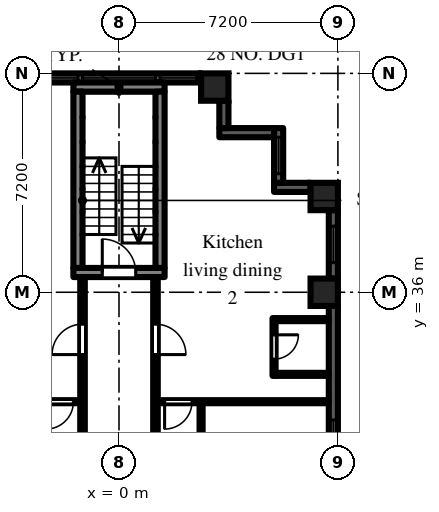
"""IFC4 building model, lengths in metres.
Left out: names, types, materials, properties, quantities, classifications, styles, units other than length and angle.
Written with IfcOpenShell. Run it as: python <this file> out.ifc"""

import sys

from ifc_helpers import new_model, si_unit, direction, frame, frame_2d, origin, origin_2d, place, context, subcontext, project, spatial, rectangle, extrude, element, fill, save


model = new_model("IFC4")
c1 = context("Model", 3, precision=1e-05, world=origin(), true_north=direction((0.0, 1.0)))
c2 = subcontext(c1, "Body", "Model", "MODEL_VIEW")
j1 = project(units=[si_unit("LENGTHUNIT", "METRE"), si_unit("PLANEANGLEUNIT", "RADIAN")], contexts=[c1])
p1 = place(None, origin())
s1 = spatial("IfcSite", under=j1, at=p1, CompositionType="ELEMENT")
p2 = place(p1, origin())
s2 = spatial("IfcBuilding", under=s1, at=p2, CompositionType="ELEMENT")
p3 = place(p2, frame((0.0, 0.0, 20.7)))
s3 = spatial("IfcBuildingStorey", under=s2, at=p3, CompositionType="ELEMENT", Elevation=20.7)
for number, where, z_axis, x_axis in (
    (1, (3.15, 42.75, 0.0), (0.0, 0.0, 1.0), (1.0, 0.0, 0.0)),
    (2, (6.75, 36.0, 0.0), (0.0, 0.0, 1.0), (1.0, 0.0, 0.0)),
    (3, (6.75, 39.15, 0.0), (0.0, 0.0, 1.0), (1.0, 0.0, 0.0)),
):
    element("IfcColumn", number, at=place(p3, frame(where, z_axis=z_axis, x_axis=x_axis)), inside=s3, PredefinedType="COLUMN", context=c2, shape_type="SweptSolid", body=[
        extrude(rectangle(XDim=0.9, YDim=0.9, at=origin_2d()), origin(), (0.0, 0.0, 1.0), 3.0),
    ])
p4 = place(p3, frame((7.05, 29.25, 0.0), z_axis=(0.0, 0.0, 1.0), x_axis=(0.0, 1.0, 0.0)))
e4 = element("IfcWall", 4, at=p4, inside=s3, PredefinedType="SOLIDWALL", context=c2, shape_type="SweptSolid", body=[
    extrude(rectangle(XDim=6.3, YDim=0.3, at=frame_2d((3.15, 0.0))), origin(), (0.0, 0.0, 1.0), 2.1),
])
p5 = place(p4, frame((0.15, 0.0, 0.2)))
e5 = element("IfcOpeningElement", 5, at=p5, cuts=e4, PredefinedType="OPENING", context=c2, shape_type="SweptSolid", body=[
    extrude(rectangle(XDim=2.4, YDim=1.85, at=frame_2d((1.2, 0.925))), frame((0.0, 0.16, 0.0), z_axis=(0.0, -1.0, 0.0), x_axis=(1.0, 0.0, 0.0)), (0.0, 0.0, 1.0), 0.32),
])
p6 = place(p3, frame((7.05, 36.45, 0.0), z_axis=(0.0, 0.0, 1.0), x_axis=(0.0, 1.0, 0.0)))
e6 = element("IfcWall", 6, at=p6, inside=s3, PredefinedType="SOLIDWALL", context=c2, shape_type="SweptSolid", body=[
    extrude(rectangle(XDim=2.25, YDim=0.3, at=frame_2d((1.125, 0.0))), origin(), (0.0, 0.0, 1.0), 2.1),
])
p7 = place(p6, frame((0.525, 0.0, 0.2)))
e7 = element("IfcOpeningElement", 7, at=p7, cuts=e6, PredefinedType="OPENING", context=c2, shape_type="SweptSolid", body=[
    extrude(rectangle(XDim=1.2, YDim=1.85, at=frame_2d((0.6, 0.925))), frame((0.0, 0.16, 0.0), z_axis=(0.0, -1.0, 0.0), x_axis=(1.0, 0.0, 0.0)), (0.0, 0.0, 1.0), 0.32),
])
p8 = place(p3, frame((6.3, 39.45, 0.0), z_axis=(0.0, 0.0, 1.0), x_axis=(-1.0, 0.0, 0.0)))
e8 = element("IfcWall", 8, at=p8, inside=s3, PredefinedType="SOLIDWALL", context=c2, shape_type="SweptSolid", body=[
    extrude(rectangle(XDim=1.2, YDim=0.3, at=frame_2d((0.6, 0.0))), origin(), (0.0, 0.0, 1.0), 2.575),
])
p9 = place(p3, frame((5.25, 39.6, 0.0), z_axis=(0.0, 0.0, 1.0), x_axis=(0.0, 1.0, 0.0)))
e9 = element("IfcWall", 9, at=p9, inside=s3, PredefinedType="SOLIDWALL", context=c2, shape_type="SweptSolid", body=[
    extrude(rectangle(XDim=1.8, YDim=0.3, at=frame_2d((0.9, 0.0))), origin(), (0.0, 0.0, 1.0), 2.575),
])
p10 = place(p9, frame((0.3, 0.0, 0.2)))
e10 = element("IfcOpeningElement", 10, at=p10, cuts=e9, PredefinedType="OPENING", context=c2, shape_type="SweptSolid", body=[
    extrude(rectangle(XDim=1.2, YDim=1.85, at=frame_2d((0.6, 0.925))), frame((0.0, 0.16, 0.0), z_axis=(0.0, -1.0, 0.0), x_axis=(1.0, 0.0, 0.0)), (0.0, 0.0, 1.0), 0.32),
])
p11 = place(p3, frame((5.1, 41.25, 0.0), z_axis=(0.0, 0.0, 1.0), x_axis=(-1.0, 0.0, 0.0)))
e11 = element("IfcWall", 11, at=p11, inside=s3, PredefinedType="SOLIDWALL", context=c2, shape_type="SweptSolid", body=[
    extrude(rectangle(XDim=1.8, YDim=0.3, at=frame_2d((0.9, 0.0))), origin(), (0.0, 0.0, 1.0), 2.575),
])
p12 = place(p3, frame((3.45, 41.4, 0.0), z_axis=(0.0, 0.0, 1.0), x_axis=(0.0, 1.0, 0.0)))
e12 = element("IfcWall", 12, at=p12, inside=s3, PredefinedType="SOLIDWALL", context=c2, shape_type="SweptSolid", body=[
    extrude(rectangle(XDim=0.9, YDim=0.3, at=frame_2d((0.45, 0.0))), origin(), (0.0, 0.0, 1.0), 2.575),
])
p13 = place(p3, frame((2.7, 43.05, 0.0), z_axis=(0.0, 0.0, 1.0), x_axis=(-1.0, 0.0, 0.0)))
e13 = element("IfcWall", 13, at=p13, inside=s3, PredefinedType="SOLIDWALL", context=c2, shape_type="SweptSolid", body=[
    extrude(rectangle(XDim=5.4, YDim=0.3, at=frame_2d((2.7, 0.0))), origin(), (0.0, 0.0, 1.0), 2.1),
])
p14 = place(p13, frame((1.5, 0.0, 0.2)))
e14 = element("IfcOpeningElement", 14, at=p14, cuts=e13, PredefinedType="OPENING", context=c2, shape_type="SweptSolid", body=[
    extrude(rectangle(XDim=2.4, YDim=1.85, at=frame_2d((1.2, 0.925))), frame((0.0, 0.16, 0.0), z_axis=(0.0, -1.0, 0.0), x_axis=(1.0, 0.0, 0.0)), (0.0, 0.0, 1.0), 0.32),
])
p15 = place(p13, frame((0.15, 0.0, 0.2)))
e15 = element("IfcOpeningElement", 15, at=p15, cuts=e13, PredefinedType="OPENING", context=c2, shape_type="SweptSolid", body=[
    extrude(rectangle(XDim=1.2, YDim=1.85, at=frame_2d((0.6, 0.925))), frame((0.0, 0.16, 0.0), z_axis=(0.0, -1.0, 0.0), x_axis=(1.0, 0.0, 0.0)), (0.0, 0.0, 1.0), 0.32),
])
p16 = place(p13, frame((4.05, 0.0, 0.2)))
e16 = element("IfcOpeningElement", 16, at=p16, cuts=e13, PredefinedType="OPENING", context=c2, shape_type="SweptSolid", body=[
    extrude(rectangle(XDim=1.2, YDim=1.85, at=frame_2d((0.6, 0.925))), frame((0.0, 0.16, 0.0), z_axis=(0.0, -1.0, 0.0), x_axis=(1.0, 0.0, 0.0)), (0.0, 0.0, 1.0), 0.32),
])
p17 = place(p3, frame((-1.5, 36.65, 0.0), z_axis=(0.0, 0.0, 1.0), x_axis=(1.0, 0.0, 0.0)))
e17 = element("IfcWall", 17, at=p17, inside=s3, PredefinedType="SHEAR", context=c2, shape_type="SweptSolid", body=[
    extrude(rectangle(XDim=3.0, YDim=0.3, at=frame_2d((1.5, 0.0))), origin(), (0.0, 0.0, 1.0), 2.575),
])
p18 = place(p17, frame((0.95, 0.0, 0.0)))
e18 = element("IfcOpeningElement", 18, at=p18, cuts=e17, PredefinedType="OPENING", context=c2, shape_type="SweptSolid", body=[
    extrude(rectangle(XDim=1.1, YDim=2.1, at=frame_2d((0.55, 1.05))), frame((0.0, 0.16, 0.0), z_axis=(0.0, -1.0, 0.0), x_axis=(1.0, 0.0, 0.0)), (0.0, 0.0, 1.0), 0.32),
])
p19 = place(p3, frame((-1.5, 42.75, 0.0), z_axis=(0.0, 0.0, 1.0), x_axis=(1.0, 0.0, 0.0)))
e19 = element("IfcWall", 19, at=p19, inside=s3, PredefinedType="SHEAR", context=c2, shape_type="SweptSolid", body=[
    extrude(rectangle(XDim=3.0, YDim=0.3, at=frame_2d((1.5, 0.0))), origin(), (0.0, 0.0, 1.0), 2.575),
])
for number, where, z_axis, x_axis in (
    (20, (-1.35, 36.8, 0.0), (0.0, 0.0, 1.0), (0.0, 1.0, 0.0)),
    (21, (1.35, 36.8, 0.0), (0.0, 0.0, 1.0), (0.0, 1.0, 0.0)),
):
    element("IfcWall", number, at=place(p3, frame(where, z_axis=z_axis, x_axis=x_axis)), inside=s3, PredefinedType="SHEAR", context=c2, shape_type="SweptSolid", body=[
        extrude(rectangle(XDim=5.8, YDim=0.3, at=frame_2d((2.9, 0.0))), origin(), (0.0, 0.0, 1.0), 2.575),
    ])
p20 = place(p3, frame((-6.9, 32.4, 0.0), z_axis=(0.0, 0.0, 1.0), x_axis=(1.0, 0.0, 0.0)))
e22 = element("IfcWall", 22, at=p20, inside=s3, PredefinedType="PARTITIONING", context=c2, shape_type="SweptSolid", body=[
    extrude(rectangle(XDim=5.625, YDim=0.1, at=frame_2d((2.812, 0.0))), origin(), (0.0, 0.0, 1.0), 2.575),
])
p21 = place(p20, frame((4.5, 0.0, 0.0)))
e23 = element("IfcOpeningElement", 23, at=p21, cuts=e22, PredefinedType="OPENING", context=c2, shape_type="SweptSolid", body=[
    extrude(rectangle(XDim=0.9, YDim=2.1, at=frame_2d((0.45, 1.05))), frame((0.0, 0.06, 0.0), z_axis=(0.0, -1.0, 0.0), x_axis=(1.0, 0.0, 0.0)), (0.0, 0.0, 1.0), 0.12),
])
p22 = place(p3, frame((-1.2, 1.275, 0.0), z_axis=(0.0, 0.0, 1.0), x_axis=(0.0, 1.0, 0.0)))
e24 = element("IfcWall", 24, at=p22, inside=s3, PredefinedType="PARTITIONING", context=c2, shape_type="SweptSolid", body=[
    extrude(rectangle(XDim=35.225, YDim=0.15, at=frame_2d((17.613, 0.0))), origin(), (0.0, 0.0, 1.0), 2.575),
])
p23 = place(p22, frame((0.675, 0.0, 0.0)))
e25 = element("IfcOpeningElement", 25, at=p23, cuts=e24, PredefinedType="OPENING", context=c2, shape_type="SweptSolid", body=[
    extrude(rectangle(XDim=0.9, YDim=2.1, at=frame_2d((0.45, 1.05))), frame((0.0, 0.085, 0.0), z_axis=(0.0, -1.0, 0.0), x_axis=(1.0, 0.0, 0.0)), (0.0, 0.0, 1.0), 0.17),
])
p24 = place(p22, frame((3.675, 0.0, 0.0)))
e26 = element("IfcOpeningElement", 26, at=p24, cuts=e24, PredefinedType="OPENING", context=c2, shape_type="SweptSolid", body=[
    extrude(rectangle(XDim=0.9, YDim=2.1, at=frame_2d((0.45, 1.05))), frame((0.0, 0.085, 0.0), z_axis=(0.0, -1.0, 0.0), x_axis=(1.0, 0.0, 0.0)), (0.0, 0.0, 1.0), 0.17),
])
p25 = place(p22, frame((11.275, 0.0, 0.0)))
e27 = element("IfcOpeningElement", 27, at=p25, cuts=e24, PredefinedType="OPENING", context=c2, shape_type="SweptSolid", body=[
    extrude(rectangle(XDim=0.9, YDim=2.1, at=frame_2d((0.45, 1.05))), frame((0.0, 0.085, 0.0), z_axis=(0.0, -1.0, 0.0), x_axis=(1.0, 0.0, 0.0)), (0.0, 0.0, 1.0), 0.17),
])
p26 = place(p22, frame((7.675, 0.0, 0.0)))
e28 = element("IfcOpeningElement", 28, at=p26, cuts=e24, PredefinedType="OPENING", context=c2, shape_type="SweptSolid", body=[
    extrude(rectangle(XDim=0.9, YDim=2.1, at=frame_2d((0.45, 1.05))), frame((0.0, 0.085, 0.0), z_axis=(0.0, -1.0, 0.0), x_axis=(1.0, 0.0, 0.0)), (0.0, 0.0, 1.0), 0.17),
])
p27 = place(p22, frame((14.475, 0.0, 0.0)))
e29 = element("IfcOpeningElement", 29, at=p27, cuts=e24, PredefinedType="OPENING", context=c2, shape_type="SweptSolid", body=[
    extrude(rectangle(XDim=0.9, YDim=2.1, at=frame_2d((0.45, 1.05))), frame((0.0, 0.085, 0.0), z_axis=(0.0, -1.0, 0.0), x_axis=(1.0, 0.0, 0.0)), (0.0, 0.0, 1.0), 0.17),
])
p28 = place(p22, frame((32.675, 0.0, 0.0)))
e30 = element("IfcOpeningElement", 30, at=p28, cuts=e24, PredefinedType="OPENING", context=c2, shape_type="SweptSolid", body=[
    extrude(rectangle(XDim=1.0, YDim=2.1, at=frame_2d((0.5, 1.05))), frame((0.0, 0.085, 0.0), z_axis=(0.0, -1.0, 0.0), x_axis=(1.0, 0.0, 0.0)), (0.0, 0.0, 1.0), 0.17),
])
p29 = place(p3, frame((1.2, 1.125, 0.0), z_axis=(0.0, 0.0, 1.0), x_axis=(0.0, 1.0, 0.0)))
e31 = element("IfcWall", 31, at=p29, inside=s3, PredefinedType="PARTITIONING", context=c2, shape_type="SweptSolid", body=[
    extrude(rectangle(XDim=35.375, YDim=0.15, at=frame_2d((17.688, 0.0))), origin(), (0.0, 0.0, 1.0), 2.575),
])
p30 = place(p29, frame((2.625, 0.0, 0.0)))
e32 = element("IfcOpeningElement", 32, at=p30, cuts=e31, PredefinedType="OPENING", context=c2, shape_type="SweptSolid", body=[
    extrude(rectangle(XDim=0.9, YDim=2.1, at=frame_2d((0.45, 1.05))), frame((0.0, 0.085, 0.0), z_axis=(0.0, -1.0, 0.0), x_axis=(1.0, 0.0, 0.0)), (0.0, 0.0, 1.0), 0.17),
])
p31 = place(p29, frame((7.425, 0.0, 0.0)))
e33 = element("IfcOpeningElement", 33, at=p31, cuts=e31, PredefinedType="OPENING", context=c2, shape_type="SweptSolid", body=[
    extrude(rectangle(XDim=0.9, YDim=2.1, at=frame_2d((0.45, 1.05))), frame((0.0, 0.085, 0.0), z_axis=(0.0, -1.0, 0.0), x_axis=(1.0, 0.0, 0.0)), (0.0, 0.0, 1.0), 0.17),
])
p32 = place(p29, frame((14.625, 0.0, 0.0)))
e34 = element("IfcOpeningElement", 34, at=p32, cuts=e31, PredefinedType="OPENING", context=c2, shape_type="SweptSolid", body=[
    extrude(rectangle(XDim=0.9, YDim=2.1, at=frame_2d((0.45, 1.05))), frame((0.0, 0.085, 0.0), z_axis=(0.0, -1.0, 0.0), x_axis=(1.0, 0.0, 0.0)), (0.0, 0.0, 1.0), 0.17),
])
p33 = place(p29, frame((32.825, 0.0, 0.0)))
e35 = element("IfcOpeningElement", 35, at=p33, cuts=e31, PredefinedType="OPENING", context=c2, shape_type="SweptSolid", body=[
    extrude(rectangle(XDim=1.0, YDim=2.1, at=frame_2d((0.5, 1.05))), frame((0.0, 0.085, 0.0), z_axis=(0.0, -1.0, 0.0), x_axis=(1.0, 0.0, 0.0)), (0.0, 0.0, 1.0), 0.17),
])
p34 = place(p3, frame((1.275, 32.4, 0.0), z_axis=(0.0, 0.0, 1.0), x_axis=(1.0, 0.0, 0.0)))
e36 = element("IfcWall", 36, at=p34, inside=s3, PredefinedType="PARTITIONING", context=c2, shape_type="SweptSolid", body=[
    extrude(rectangle(XDim=5.625, YDim=0.1, at=frame_2d((2.812, 0.0))), origin(), (0.0, 0.0, 1.0), 2.575),
])
p35 = place(p34, frame((0.225, 0.0, 0.0)))
e37 = element("IfcOpeningElement", 37, at=p35, cuts=e36, PredefinedType="OPENING", context=c2, shape_type="SweptSolid", body=[
    extrude(rectangle(XDim=0.9, YDim=2.1, at=frame_2d((0.45, 1.05))), frame((0.0, 0.06, 0.0), z_axis=(0.0, -1.0, 0.0), x_axis=(1.0, 0.0, 0.0)), (0.0, 0.0, 1.0), 0.12),
])
p36 = place(p3, frame((2.7, 18.05, 0.0), z_axis=(0.0, 0.0, 1.0), x_axis=(0.0, 1.0, 0.0)))
e38 = element("IfcWall", 38, at=p36, inside=s3, PredefinedType="PARTITIONING", context=c2, shape_type="SweptSolid", body=[
    extrude(rectangle(XDim=14.3, YDim=0.1, at=frame_2d((7.15, 0.0))), origin(), (0.0, 0.0, 1.0), 2.575),
])
p37 = place(p36, frame((3.28, 0.0, 0.0)))
e39 = element("IfcOpeningElement", 39, at=p37, cuts=e38, PredefinedType="OPENING", context=c2, shape_type="SweptSolid", body=[
    extrude(rectangle(XDim=0.9, YDim=2.1, at=frame_2d((0.45, 1.05))), frame((0.0, 0.06, 0.0), z_axis=(0.0, -1.0, 0.0), x_axis=(1.0, 0.0, 0.0)), (0.0, 0.0, 1.0), 0.12),
])
p38 = place(p36, frame((10.12, 0.0, 0.0)))
e40 = element("IfcOpeningElement", 40, at=p38, cuts=e38, PredefinedType="OPENING", context=c2, shape_type="SweptSolid", body=[
    extrude(rectangle(XDim=0.9, YDim=2.1, at=frame_2d((0.45, 1.05))), frame((0.0, 0.06, 0.0), z_axis=(0.0, -1.0, 0.0), x_axis=(1.0, 0.0, 0.0)), (0.0, 0.0, 1.0), 0.12),
])
p39 = place(p3, frame((5.1, 33.25, 0.0), z_axis=(0.0, 0.0, 1.0), x_axis=(0.0, 1.0, 0.0)))
e41 = element("IfcWall", 41, at=p39, inside=s3, PredefinedType="PARTITIONING", context=c2, shape_type="SweptSolid", body=[
    extrude(rectangle(XDim=1.9, YDim=0.1, at=frame_2d((0.95, 0.0))), origin(), (0.0, 0.0, 1.0), 2.575),
])
p40 = place(p39, frame((0.55, 0.0, 0.0)))
e42 = element("IfcOpeningElement", 42, at=p40, cuts=e41, PredefinedType="OPENING", context=c2, shape_type="SweptSolid", body=[
    extrude(rectangle(XDim=0.8, YDim=2.1, at=frame_2d((0.4, 1.05))), frame((0.0, 0.06, 0.0), z_axis=(0.0, -1.0, 0.0), x_axis=(1.0, 0.0, 0.0)), (0.0, 0.0, 1.0), 0.12),
])
for number, where, z_axis, x_axis in (
    (43, (5.15, 33.3, 0.0), (0.0, 0.0, 1.0), (1.0, 0.0, 0.0)),
    (44, (5.15, 35.1, 0.0), (0.0, 0.0, 1.0), (1.0, 0.0, 0.0)),
):
    element("IfcWall", number, at=place(p3, frame(where, z_axis=z_axis, x_axis=x_axis)), inside=s3, PredefinedType="PARTITIONING", context=c2, shape_type="SweptSolid", body=[
        extrude(rectangle(XDim=1.75, YDim=0.1, at=frame_2d((0.875, 0.0))), origin(), (0.0, 0.0, 1.0), 2.575),
    ])
p41 = place(p5, origin())
e45 = element("IfcWindow", 45, at=p41, inside=s3, PartitioningType="SINGLE_PANEL", PredefinedType="WINDOW", context=c2, shape_type="SweptSolid", body=[
    extrude(rectangle(XDim=2.4, YDim=1.85, at=frame_2d((1.2, 0.925))), frame((0.0, 0.03, 0.0), z_axis=(0.0, -1.0, 0.0), x_axis=(1.0, 0.0, 0.0)), (0.0, 0.0, 1.0), 0.06),
])
fill(e5, e45)
p42 = place(p7, origin())
e46 = element("IfcWindow", 46, at=p42, inside=s3, PartitioningType="SINGLE_PANEL", PredefinedType="WINDOW", context=c2, shape_type="SweptSolid", body=[
    extrude(rectangle(XDim=1.2, YDim=1.85, at=frame_2d((0.6, 0.925))), frame((0.0, 0.03, 0.0), z_axis=(0.0, -1.0, 0.0), x_axis=(1.0, 0.0, 0.0)), (0.0, 0.0, 1.0), 0.06),
])
fill(e7, e46)
p43 = place(p10, origin())
e47 = element("IfcWindow", 47, at=p43, inside=s3, PartitioningType="SINGLE_PANEL", PredefinedType="WINDOW", context=c2, shape_type="SweptSolid", body=[
    extrude(rectangle(XDim=1.2, YDim=1.85, at=frame_2d((0.6, 0.925))), frame((0.0, 0.03, 0.0), z_axis=(0.0, -1.0, 0.0), x_axis=(1.0, 0.0, 0.0)), (0.0, 0.0, 1.0), 0.06),
])
fill(e10, e47)
p44 = place(p14, origin())
e48 = element("IfcWindow", 48, at=p44, inside=s3, PartitioningType="SINGLE_PANEL", PredefinedType="WINDOW", context=c2, shape_type="SweptSolid", body=[
    extrude(rectangle(XDim=2.4, YDim=1.85, at=frame_2d((1.2, 0.925))), frame((0.0, 0.03, 0.0), z_axis=(0.0, -1.0, 0.0), x_axis=(1.0, 0.0, 0.0)), (0.0, 0.0, 1.0), 0.06),
])
fill(e14, e48)
p45 = place(p15, origin())
e49 = element("IfcWindow", 49, at=p45, inside=s3, PartitioningType="SINGLE_PANEL", PredefinedType="WINDOW", context=c2, shape_type="SweptSolid", body=[
    extrude(rectangle(XDim=1.2, YDim=1.85, at=frame_2d((0.6, 0.925))), frame((0.0, 0.03, 0.0), z_axis=(0.0, -1.0, 0.0), x_axis=(1.0, 0.0, 0.0)), (0.0, 0.0, 1.0), 0.06),
])
fill(e15, e49)
p46 = place(p16, origin())
e50 = element("IfcWindow", 50, at=p46, inside=s3, PartitioningType="SINGLE_PANEL", PredefinedType="WINDOW", context=c2, shape_type="SweptSolid", body=[
    extrude(rectangle(XDim=1.2, YDim=1.85, at=frame_2d((0.6, 0.925))), frame((0.0, 0.03, 0.0), z_axis=(0.0, -1.0, 0.0), x_axis=(1.0, 0.0, 0.0)), (0.0, 0.0, 1.0), 0.06),
])
fill(e16, e50)
p47 = place(p18, origin())
e51 = element("IfcDoor", 51, at=p47, inside=s3, OperationType="SINGLE_SWING_LEFT", PredefinedType="DOOR", context=c2, shape_type="SweptSolid", body=[
    extrude(rectangle(XDim=1.1, YDim=2.1, at=frame_2d((0.55, 1.05))), frame((0.0, 0.025, 0.0), z_axis=(0.0, -1.0, 0.0), x_axis=(1.0, 0.0, 0.0)), (0.0, 0.0, 1.0), 0.05),
])
fill(e18, e51)
p48 = place(p28, origin())
e52 = element("IfcDoor", 52, at=p48, inside=s3, OperationType="SINGLE_SWING_LEFT", PredefinedType="DOOR", context=c2, shape_type="SweptSolid", body=[
    extrude(rectangle(XDim=1.0, YDim=2.1, at=frame_2d((0.5, 1.05))), frame((0.0, 0.025, 0.0), z_axis=(0.0, -1.0, 0.0), x_axis=(1.0, 0.0, 0.0)), (0.0, 0.0, 1.0), 0.05),
])
fill(e30, e52)
p49 = place(p21, frame((0.9, 0.0, 0.0), z_axis=(0.0, 0.0, 1.0), x_axis=(-1.0, 0.0, 0.0)))
e53 = element("IfcDoor", 53, at=p49, inside=s3, OperationType="SINGLE_SWING_RIGHT", PredefinedType="DOOR", context=c2, shape_type="SweptSolid", body=[
    extrude(rectangle(XDim=0.9, YDim=2.1, at=frame_2d((0.45, 1.05))), frame((0.0, 0.025, 0.0), z_axis=(0.0, -1.0, 0.0), x_axis=(1.0, 0.0, 0.0)), (0.0, 0.0, 1.0), 0.05),
])
fill(e23, e53)
p50 = place(p40, frame((0.8, 0.0, 0.0), z_axis=(0.0, 0.0, 1.0), x_axis=(-1.0, 0.0, 0.0)))
e54 = element("IfcDoor", 54, at=p50, inside=s3, OperationType="SINGLE_SWING_LEFT", PredefinedType="DOOR", context=c2, shape_type="SweptSolid", body=[
    extrude(rectangle(XDim=0.8, YDim=2.1, at=frame_2d((0.4, 1.05))), frame((0.0, 0.025, 0.0), z_axis=(0.0, -1.0, 0.0), x_axis=(1.0, 0.0, 0.0)), (0.0, 0.0, 1.0), 0.05),
])
fill(e42, e54)
p51 = place(p33, frame((1.0, 0.0, 0.0), z_axis=(0.0, 0.0, 1.0), x_axis=(-1.0, 0.0, 0.0)))
e55 = element("IfcDoor", 55, at=p51, inside=s3, OperationType="SINGLE_SWING_RIGHT", PredefinedType="DOOR", context=c2, shape_type="SweptSolid", body=[
    extrude(rectangle(XDim=1.0, YDim=2.1, at=frame_2d((0.5, 1.05))), frame((0.0, 0.025, 0.0), z_axis=(0.0, -1.0, 0.0), x_axis=(1.0, 0.0, 0.0)), (0.0, 0.0, 1.0), 0.05),
])
fill(e35, e55)
p52 = place(p35, frame((0.9, 0.0, 0.0), z_axis=(0.0, 0.0, 1.0), x_axis=(-1.0, 0.0, 0.0)))
e56 = element("IfcDoor", 56, at=p52, inside=s3, OperationType="SINGLE_SWING_RIGHT", PredefinedType="DOOR", context=c2, shape_type="SweptSolid", body=[
    extrude(rectangle(XDim=0.9, YDim=2.1, at=frame_2d((0.45, 1.05))), frame((0.0, 0.025, 0.0), z_axis=(0.0, -1.0, 0.0), x_axis=(1.0, 0.0, 0.0)), (0.0, 0.0, 1.0), 0.05),
])
fill(e37, e56)
save(model, sys.argv[1])
